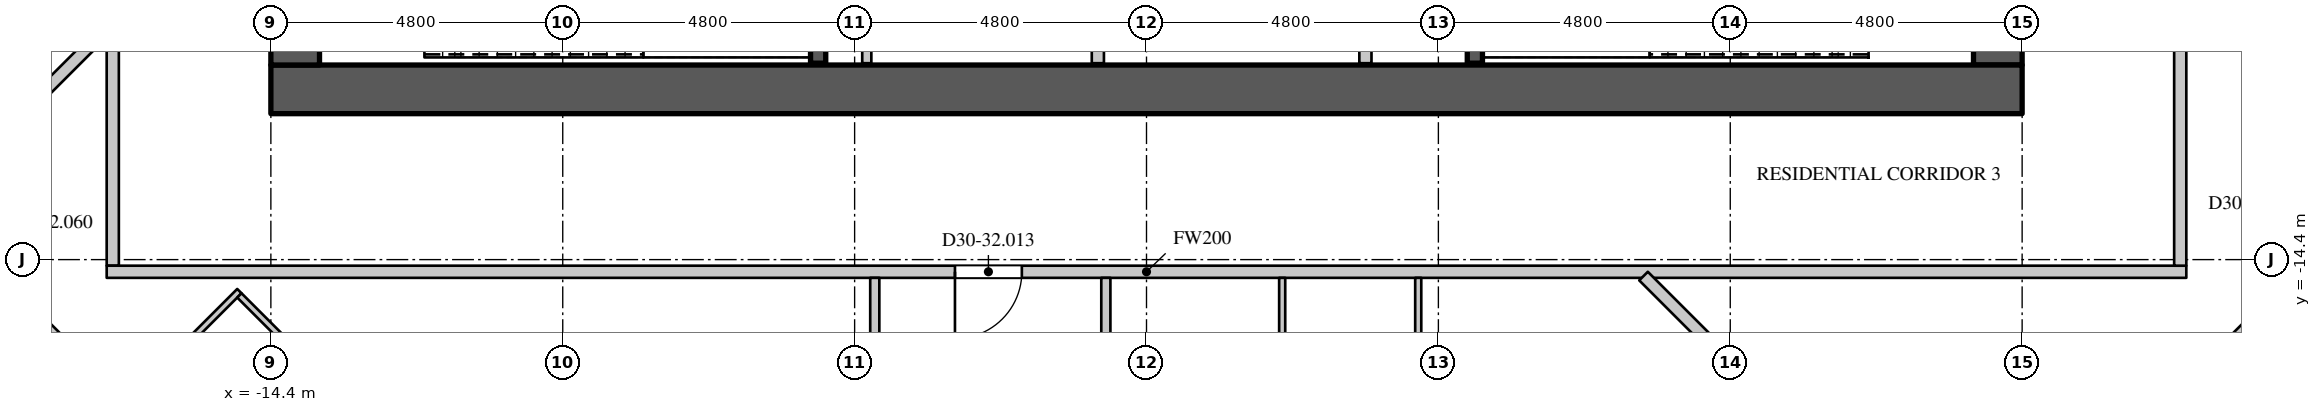
"""IFC4 building model, lengths in metres.
Left out: names, types, materials, properties, quantities, classifications, styles, units other than length and angle.
Written with IfcOpenShell. Run it as: python <this file> out.ifc"""

import sys

from ifc_helpers import new_model, si_unit, direction, frame, frame_2d, origin, place, context, subcontext, project, spatial, rectangle, extrude, element, fill, save


model = new_model("IFC4")
c1 = context("Model", 3, precision=1e-05, world=origin(), true_north=direction((0.0, 1.0)))
c2 = subcontext(c1, "Body", "Model", "MODEL_VIEW")
j1 = project(units=[si_unit("LENGTHUNIT", "METRE"), si_unit("PLANEANGLEUNIT", "RADIAN")], contexts=[c1])
p1 = place(None, origin())
s1 = spatial("IfcSite", under=j1, at=p1, CompositionType="ELEMENT")
p2 = place(p1, origin())
s2 = spatial("IfcBuilding", under=s1, at=p2, CompositionType="ELEMENT")
p3 = place(p2, frame((0.0, 0.0, 131.7)))
s3 = spatial("IfcBuildingStorey", under=s2, at=p3, CompositionType="ELEMENT", Elevation=131.7)
p4 = place(p3, frame((-14.4, -11.6, 0.0), z_axis=(0.0, 0.0, 1.0), x_axis=(1.0, 0.0, 0.0)))
e1 = element("IfcWall", 1, at=p4, inside=s3, PredefinedType="SHEAR", context=c2, shape_type="SweptSolid", body=[
    extrude(rectangle(XDim=28.8, YDim=0.8, at=frame_2d((14.4, 0.0))), origin(), (0.0, 0.0, 1.0), 4.2),
])
p5 = place(p3, frame((14.0, -11.2, 0.0), z_axis=(0.0, 0.0, 1.0), x_axis=(0.0, 1.0, 0.0)))
e2 = element("IfcWall", 2, at=p5, inside=s3, PredefinedType="SHEAR", context=c2, shape_type="SweptSolid", body=[
    extrude(rectangle(XDim=22.4, YDim=0.8, at=frame_2d((11.2, 0.0))), origin(), (0.0, 0.0, 1.0), 4.2),
])
p6 = place(p5, frame((20.25, 0.0, 0.0)))
e3 = element("IfcOpeningElement", 3, at=p6, cuts=e2, PredefinedType="OPENING", context=c2, shape_type="SweptSolid", body=[
    extrude(rectangle(XDim=1.1, YDim=2.2, at=frame_2d((0.55, 1.1))), frame((0.0, 0.41, 0.0), z_axis=(0.0, -1.0, 0.0), x_axis=(1.0, 0.0, 0.0)), (0.0, 0.0, 1.0), 0.82),
])
p7 = place(p5, frame((1.05, 0.0, 0.0)))
e4 = element("IfcOpeningElement", 4, at=p7, cuts=e2, PredefinedType="OPENING", context=c2, shape_type="SweptSolid", body=[
    extrude(rectangle(XDim=1.1, YDim=2.2, at=frame_2d((0.55, 1.1))), frame((0.0, 0.41, 0.0), z_axis=(0.0, -1.0, 0.0), x_axis=(1.0, 0.0, 0.0)), (0.0, 0.0, 1.0), 0.82),
])
p8 = place(p5, frame((14.75, 0.0, 0.0)))
e5 = element("IfcOpeningElement", 5, at=p8, cuts=e2, PredefinedType="OPENING", context=c2, shape_type="SweptSolid", body=[
    extrude(rectangle(XDim=1.5, YDim=2.4, at=frame_2d((0.75, 1.2))), frame((0.0, 0.41, 0.0), z_axis=(0.0, -1.0, 0.0), x_axis=(1.0, 0.0, 0.0)), (0.0, 0.0, 1.0), 0.82),
])
p9 = place(p5, frame((6.15, 0.0, 0.0)))
e6 = element("IfcOpeningElement", 6, at=p9, cuts=e2, PredefinedType="OPENING", context=c2, shape_type="SweptSolid", body=[
    extrude(rectangle(XDim=1.5, YDim=2.4, at=frame_2d((0.75, 1.2))), frame((0.0, 0.41, 0.0), z_axis=(0.0, -1.0, 0.0), x_axis=(1.0, 0.0, 0.0)), (0.0, 0.0, 1.0), 0.82),
])
p10 = place(p3, frame((-14.0, -11.2, 0.0), z_axis=(0.0, 0.0, 1.0), x_axis=(0.0, 1.0, 0.0)))
e7 = element("IfcWall", 7, at=p10, inside=s3, PredefinedType="SHEAR", context=c2, shape_type="SweptSolid", body=[
    extrude(rectangle(XDim=22.4, YDim=0.8, at=frame_2d((11.2, 0.0))), origin(), (0.0, 0.0, 1.0), 4.2),
])
p11 = place(p10, frame((20.25, 0.0, 0.0)))
e8 = element("IfcOpeningElement", 8, at=p11, cuts=e7, PredefinedType="OPENING", context=c2, shape_type="SweptSolid", body=[
    extrude(rectangle(XDim=1.1, YDim=2.2, at=frame_2d((0.55, 1.1))), frame((0.0, 0.41, 0.0), z_axis=(0.0, -1.0, 0.0), x_axis=(1.0, 0.0, 0.0)), (0.0, 0.0, 1.0), 0.82),
])
p12 = place(p10, frame((1.05, 0.0, 0.0)))
e9 = element("IfcOpeningElement", 9, at=p12, cuts=e7, PredefinedType="OPENING", context=c2, shape_type="SweptSolid", body=[
    extrude(rectangle(XDim=1.1, YDim=2.2, at=frame_2d((0.55, 1.1))), frame((0.0, 0.41, 0.0), z_axis=(0.0, -1.0, 0.0), x_axis=(1.0, 0.0, 0.0)), (0.0, 0.0, 1.0), 0.82),
])
p13 = place(p10, frame((15.95, 0.0, 0.0)))
e10 = element("IfcOpeningElement", 10, at=p13, cuts=e7, PredefinedType="OPENING", context=c2, shape_type="SweptSolid", body=[
    extrude(rectangle(XDim=1.5, YDim=2.4, at=frame_2d((0.75, 1.2))), frame((0.0, 0.41, 0.0), z_axis=(0.0, -1.0, 0.0), x_axis=(1.0, 0.0, 0.0)), (0.0, 0.0, 1.0), 0.82),
])
p14 = place(p10, frame((4.95, 0.0, 0.0)))
e11 = element("IfcOpeningElement", 11, at=p14, cuts=e7, PredefinedType="OPENING", context=c2, shape_type="SweptSolid", body=[
    extrude(rectangle(XDim=1.5, YDim=2.4, at=frame_2d((0.75, 1.2))), frame((0.0, 0.41, 0.0), z_axis=(0.0, -1.0, 0.0), x_axis=(1.0, 0.0, 0.0)), (0.0, 0.0, 1.0), 0.82),
])
p15 = place(p3, frame((-17.0, -14.5, 0.0), z_axis=(0.0, 0.0, 1.0), x_axis=(0.0, 1.0, 0.0)))
e12 = element("IfcWall", 12, at=p15, inside=s3, PredefinedType="PARTITIONING", context=c2, shape_type="SweptSolid", body=[
    extrude(rectangle(XDim=29.0, YDim=0.2, at=frame_2d((14.5, 0.0))), origin(), (0.0, 0.0, 1.0), 3.95),
])
p16 = place(p15, frame((15.95, 0.0, 0.0)))
e13 = element("IfcOpeningElement", 13, at=p16, cuts=e12, PredefinedType="OPENING", context=c2, shape_type="SweptSolid", body=[
    extrude(rectangle(XDim=1.1, YDim=2.4, at=frame_2d((0.55, 1.2))), frame((0.0, 0.11, 0.0), z_axis=(0.0, -1.0, 0.0), x_axis=(1.0, 0.0, 0.0)), (0.0, 0.0, 1.0), 0.22),
])
p17 = place(p3, frame((-17.1, -14.6, 0.0), z_axis=(0.0, 0.0, 1.0), x_axis=(1.0, 0.0, 0.0)))
e14 = element("IfcWall", 14, at=p17, inside=s3, PredefinedType="PARTITIONING", context=c2, shape_type="SweptSolid", body=[
    extrude(rectangle(XDim=34.2, YDim=0.2, at=frame_2d((17.1, 0.0))), origin(), (0.0, 0.0, 1.0), 3.95),
])
p18 = place(p17, frame((13.95, 0.0, 0.0)))
e15 = element("IfcOpeningElement", 15, at=p18, cuts=e14, PredefinedType="OPENING", context=c2, shape_type="SweptSolid", body=[
    extrude(rectangle(XDim=1.1, YDim=2.4, at=frame_2d((0.55, 1.2))), frame((0.0, 0.11, 0.0), z_axis=(0.0, -1.0, 0.0), x_axis=(1.0, 0.0, 0.0)), (0.0, 0.0, 1.0), 0.22),
])
p19 = place(p3, frame((17.0, -14.5, 0.0), z_axis=(0.0, 0.0, 1.0), x_axis=(0.0, 1.0, 0.0)))
e16 = element("IfcWall", 16, at=p19, inside=s3, PredefinedType="PARTITIONING", context=c2, shape_type="SweptSolid", body=[
    extrude(rectangle(XDim=29.0, YDim=0.2, at=frame_2d((14.5, 0.0))), origin(), (0.0, 0.0, 1.0), 3.95),
])
p20 = place(p19, frame((11.8, 0.0, 0.0)))
e17 = element("IfcOpeningElement", 17, at=p20, cuts=e16, PredefinedType="OPENING", context=c2, shape_type="SweptSolid", body=[
    extrude(rectangle(XDim=1.1, YDim=2.4, at=frame_2d((0.55, 1.2))), frame((0.0, 0.11, 0.0), z_axis=(0.0, -1.0, 0.0), x_axis=(1.0, 0.0, 0.0)), (0.0, 0.0, 1.0), 0.22),
])
p21 = place(p3, frame((-20.04, -13.543, 0.0), z_axis=(0.0, 0.0, 1.0), x_axis=(0.707133793192, -0.707079768149, 0.0)))
e18 = element("IfcWall", 18, at=p21, inside=s3, PredefinedType="PARTITIONING", context=c2, shape_type="SweptSolid", body=[
    extrude(rectangle(XDim=4.519, YDim=0.15, at=frame_2d((2.26, 0.0))), origin(), (0.0, 0.0, 1.0), 3.95),
])
p22 = place(p21, frame((0.4, 0.0, 0.0)))
e19 = element("IfcOpeningElement", 19, at=p22, cuts=e18, PredefinedType="OPENING", context=c2, shape_type="SweptSolid", body=[
    extrude(rectangle(XDim=0.95, YDim=2.2, at=frame_2d((0.475, 1.1))), frame((0.0, 0.085, 0.0), z_axis=(0.0, -1.0, 0.0), x_axis=(1.0, 0.0, 0.0)), (0.0, 0.0, 1.0), 0.17),
])
p23 = place(p3, frame((-4.6, -11.17, 0.0), z_axis=(0.0, 0.0, 1.0), x_axis=(0.0, 1.0, 0.0)))
e20 = element("IfcWall", 20, at=p23, inside=s3, PredefinedType="PARTITIONING", context=c2, shape_type="SweptSolid", body=[
    extrude(rectangle(XDim=5.27, YDim=0.15, at=frame_2d((2.635, 0.0))), origin(), (0.0, 0.0, 1.0), 3.95),
])
p24 = place(p3, frame((-4.469, -25.65, 0.0), z_axis=(0.0, 0.0, 1.0), x_axis=(0.0, 1.0, 0.0)))
e21 = element("IfcWall", 21, at=p24, inside=s3, PredefinedType="PARTITIONING", context=c2, shape_type="SweptSolid", body=[
    extrude(rectangle(XDim=10.95, YDim=0.15, at=frame_2d((5.475, 0.0))), origin(), (0.0, 0.0, 1.0), 3.3),
])
p25 = place(p24, frame((7.35, 0.0, 0.0)))
e22 = element("IfcOpeningElement", 22, at=p25, cuts=e21, PredefinedType="OPENING", context=c2, shape_type="SweptSolid", body=[
    extrude(rectangle(XDim=0.95, YDim=2.2, at=frame_2d((0.475, 1.1))), frame((0.0, 0.085, 0.0), z_axis=(0.0, -1.0, 0.0), x_axis=(1.0, 0.0, 0.0)), (0.0, 0.0, 1.0), 0.17),
])
p26 = place(p3, frame((-0.669, -20.925, 0.0), z_axis=(0.0, 0.0, 1.0), x_axis=(0.0, 1.0, 0.0)))
e23 = element("IfcWall", 23, at=p26, inside=s3, PredefinedType="PARTITIONING", context=c2, shape_type="SweptSolid", body=[
    extrude(rectangle(XDim=6.225, YDim=0.15, at=frame_2d((3.113, 0.0))), origin(), (0.0, 0.0, 1.0), 3.95),
])
p27 = place(p26, frame((2.65, 0.0, 0.0)))
e24 = element("IfcOpeningElement", 24, at=p27, cuts=e23, PredefinedType="OPENING", context=c2, shape_type="SweptSolid", body=[
    extrude(rectangle(XDim=0.95, YDim=2.2, at=frame_2d((0.475, 1.1))), frame((0.0, 0.085, 0.0), z_axis=(0.0, -1.0, 0.0), x_axis=(1.0, 0.0, 0.0)), (0.0, 0.0, 1.0), 0.17),
])
p28 = place(p3, frame((15.509, -18.074, 0.0), z_axis=(0.0, 0.0, 1.0), x_axis=(0.707106781187, 0.707106781187, 0.0)))
e25 = element("IfcWall", 25, at=p28, inside=s3, PredefinedType="PARTITIONING", context=c2, shape_type="SweptSolid", body=[
    extrude(rectangle(XDim=9.255, YDim=0.15, at=frame_2d((4.627, 0.0))), origin(), (0.0, 0.0, 1.0), 3.95),
])
p29 = place(p28, frame((8.1, 0.0, 0.0)))
e26 = element("IfcOpeningElement", 26, at=p29, cuts=e25, PredefinedType="OPENING", context=c2, shape_type="SweptSolid", body=[
    extrude(rectangle(XDim=0.95, YDim=2.2, at=frame_2d((0.475, 1.1))), frame((0.0, 0.085, 0.0), z_axis=(0.0, -1.0, 0.0), x_axis=(1.0, 0.0, 0.0)), (0.0, 0.0, 1.0), 0.17),
])
p30 = place(p28, frame((5.05, 0.0, 0.0)))
e27 = element("IfcOpeningElement", 27, at=p30, cuts=e25, PredefinedType="OPENING", context=c2, shape_type="SweptSolid", body=[
    extrude(rectangle(XDim=0.95, YDim=2.2, at=frame_2d((0.475, 1.1))), frame((0.0, 0.085, 0.0), z_axis=(0.0, -1.0, 0.0), x_axis=(1.0, 0.0, 0.0)), (0.0, 0.0, 1.0), 0.17),
])
p31 = place(p28, frame((0.45, 0.0, 0.0)))
e28 = element("IfcOpeningElement", 28, at=p31, cuts=e25, PredefinedType="OPENING", context=c2, shape_type="SweptSolid", body=[
    extrude(rectangle(XDim=0.95, YDim=2.2, at=frame_2d((0.475, 1.1))), frame((0.0, 0.085, 0.0), z_axis=(0.0, -1.0, 0.0), x_axis=(1.0, 0.0, 0.0)), (0.0, 0.0, 1.0), 0.17),
])
p32 = place(p3, frame((-23.19, -16.693, 0.0), z_axis=(0.0, 0.0, 1.0), x_axis=(0.707106781187, 0.707106781187, 0.0)))
e29 = element("IfcWall", 29, at=p32, inside=s3, PredefinedType="PARTITIONING", context=c2, shape_type="SweptSolid", body=[
    extrude(rectangle(XDim=8.655, YDim=0.2, at=frame_2d((4.327, 0.0))), origin(), (0.0, 0.0, 1.0), 3.95),
])
p33 = place(p3, frame((8.174, -14.671, 0.0), z_axis=(0.0, 0.0, 1.0), x_axis=(0.707106781187, -0.707106781187, 0.0)))
e30 = element("IfcWall", 30, at=p33, inside=s3, PredefinedType="PARTITIONING", context=c2, shape_type="SweptSolid", body=[
    extrude(rectangle(XDim=12.049, YDim=0.2, at=frame_2d((6.024, 0.0))), origin(), (0.0, 0.0, 1.0), 3.95),
])
for number, where, z_axis, x_axis in (
    (31, (-0.8, -11.17, 0.0), (0.0, 0.0, 1.0), (0.0, 1.0, 0.0)),
    (32, (3.6, -11.17, 0.0), (0.0, 0.0, 1.0), (0.0, 1.0, 0.0)),
):
    element("IfcWall", number, at=place(p3, frame(where, z_axis=z_axis, x_axis=x_axis)), inside=s3, PredefinedType="PARTITIONING", context=c2, shape_type="SweptSolid", body=[
        extrude(rectangle(XDim=5.27, YDim=0.2, at=frame_2d((2.635, 0.0))), origin(), (0.0, 0.0, 1.0), 3.95),
    ])
for number, where, z_axis, x_axis in (
    (33, (-5.4, -11.17, 0.0), (0.0, 0.0, 1.0), (0.0, 1.0, 0.0)),
    (34, (5.4, -11.17, 0.0), (0.0, 0.0, 1.0), (0.0, 1.0, 0.0)),
):
    element("IfcWall", number, at=place(p3, frame(where, z_axis=z_axis, x_axis=x_axis)), inside=s3, PredefinedType="SHEAR", context=c2, shape_type="SweptSolid", body=[
        extrude(rectangle(XDim=2.845, YDim=0.25, at=frame_2d((1.422, 0.0))), origin(), (0.0, 0.0, 1.0), 3.95),
    ])
p34 = place(p3, frame((-16.353, -16.353, 0.0), z_axis=(0.0, 0.0, 1.0), x_axis=(0.707106781187, 0.707106781187, 0.0)))
e35 = element("IfcWall", 35, at=p34, inside=s3, PredefinedType="PARTITIONING", context=c2, shape_type="SweptSolid", body=[
    extrude(rectangle(XDim=2.03, YDim=0.1, at=frame_2d((1.015, 0.0))), origin(), (0.0, 0.0, 1.0), 3.95),
])
p35 = place(p3, frame((-14.918, -14.989, 0.0), z_axis=(0.0, 0.0, 1.0), x_axis=(0.707059830104, -0.707153729152, 0.0)))
e36 = element("IfcWall", 36, at=p35, inside=s3, PredefinedType="PARTITIONING", context=c2, shape_type="SweptSolid", body=[
    extrude(rectangle(XDim=2.6, YDim=0.1, at=frame_2d((1.3, 0.0))), origin(), (0.0, 0.0, 1.0), 3.95),
])
p36 = place(p3, frame((2.231, -20.925, 0.0), z_axis=(0.0, 0.0, 1.0), x_axis=(0.0, 1.0, 0.0)))
e37 = element("IfcWall", 37, at=p36, inside=s3, PredefinedType="PARTITIONING", context=c2, shape_type="SweptSolid", body=[
    extrude(rectangle(XDim=6.225, YDim=0.1, at=frame_2d((3.113, 0.0))), origin(), (0.0, 0.0, 1.0), 3.95),
])
p37 = place(p3, frame((4.469, -21.02, 0.0), z_axis=(0.0, 0.0, 1.0), x_axis=(0.0, 1.0, 0.0)))
e38 = element("IfcWall", 38, at=p37, inside=s3, PredefinedType="PARTITIONING", context=c2, shape_type="SweptSolid", body=[
    extrude(rectangle(XDim=6.32, YDim=0.1, at=frame_2d((3.16, 0.0))), origin(), (0.0, 0.0, 1.0), 3.3),
])
p38 = place(p37, frame((2.75, 0.0, 0.0)))
e39 = element("IfcOpeningElement", 39, at=p38, cuts=e38, PredefinedType="OPENING", context=c2, shape_type="SweptSolid", body=[
    extrude(rectangle(XDim=0.9, YDim=2.2, at=frame_2d((0.45, 1.1))), frame((0.0, 0.06, 0.0), z_axis=(0.0, -1.0, 0.0), x_axis=(1.0, 0.0, 0.0)), (0.0, 0.0, 1.0), 0.12),
])
p39 = place(p18, origin())
e40 = element("IfcDoor", 40, at=p39, inside=s3, OperationType="SINGLE_SWING_RIGHT", PredefinedType="DOOR", context=c2, shape_type="SweptSolid", body=[
    extrude(rectangle(XDim=1.1, YDim=2.4, at=frame_2d((0.55, 1.2))), frame((0.0, 0.025, 0.0), z_axis=(0.0, -1.0, 0.0), x_axis=(1.0, 0.0, 0.0)), (0.0, 0.0, 1.0), 0.05),
])
fill(e15, e40)
save(model, sys.argv[1])
